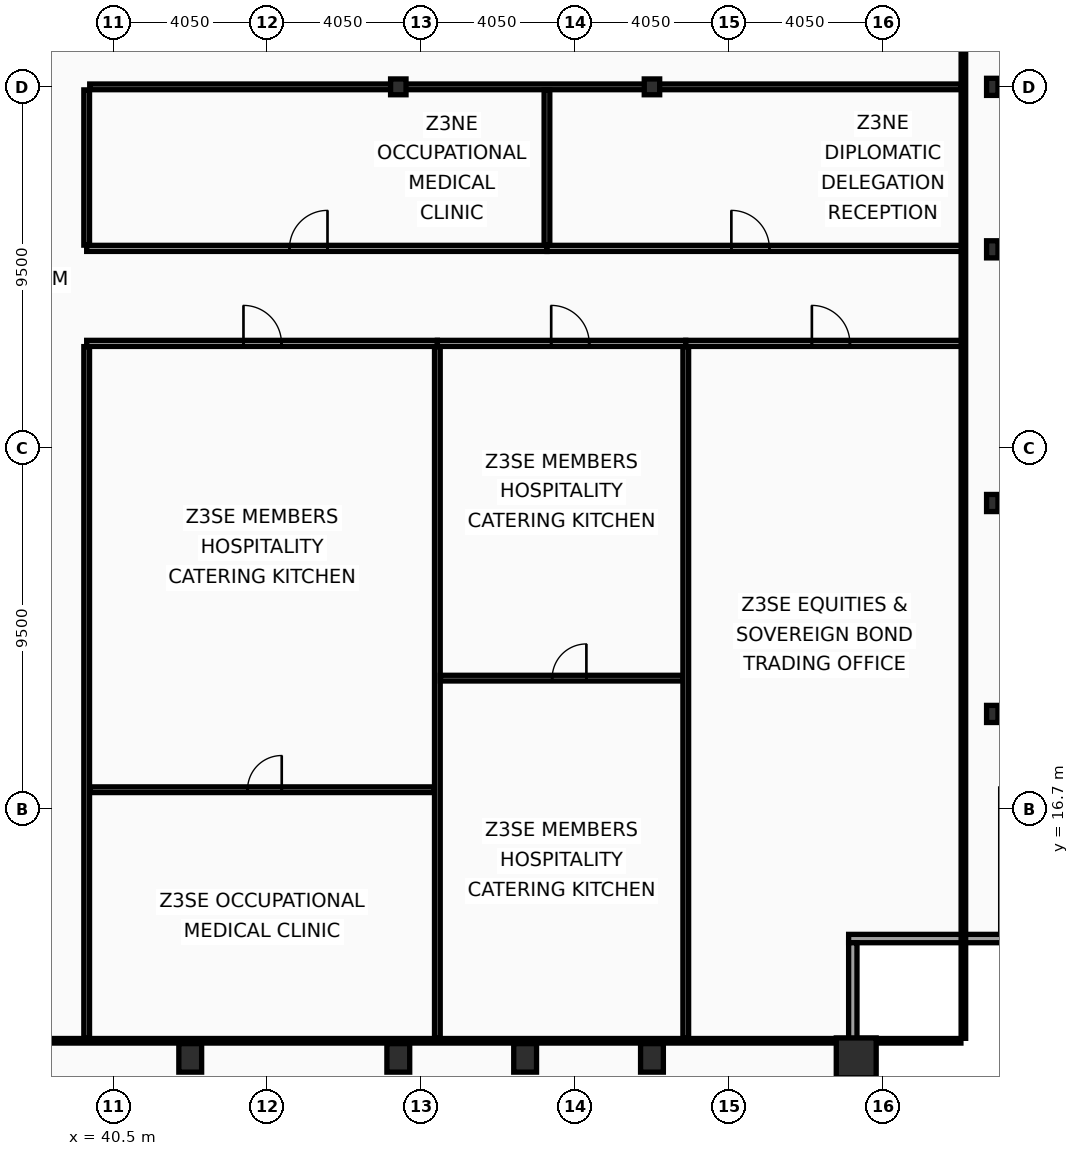
"""IFC4 building model, lengths in metres.
Left out: names, types, materials, properties, quantities, classifications, styles, units other than length and angle.
Written with IfcOpenShell. Run it as: python <this file> out.ifc"""

import sys

from ifc_helpers import new_model, si_unit, direction, frame, frame_2d, origin, origin_2d, place, context, subcontext, project, spatial, rectangle, hollow_rectangle, i_section, extrude, element, fill, save


model = new_model("IFC4")
c1 = context("Model", 3, precision=1e-05, world=origin(), true_north=direction((0.0, 1.0)))
c2 = subcontext(c1, "Body", "Model", "MODEL_VIEW")
j1 = project(units=[si_unit("LENGTHUNIT", "METRE"), si_unit("PLANEANGLEUNIT", "RADIAN")], contexts=[c1])
p1 = place(None, origin())
s1 = spatial("IfcSite", under=j1, at=p1, CompositionType="ELEMENT")
p2 = place(p1, origin())
s2 = spatial("IfcBuilding", under=s1, at=p2, CompositionType="ELEMENT")
p3 = place(p2, frame((0.0, 0.0, 249.8)))
s3 = spatial("IfcBuildingStorey", under=s2, at=p3, CompositionType="ELEMENT", Elevation=249.8)
p4 = place(p3, frame((60.05, 10.15, 0.0), z_axis=(0.0, 0.0, 1.0), x_axis=(1.0, 0.0, 0.0)))
e1 = element("IfcColumn", 1, at=p4, inside=s3, PredefinedType="COLUMN", context=c2, shape_type="SweptSolid", body=[
    extrude(hollow_rectangle(XDim=1.05, YDim=1.05, WallThickness=0.055, at=origin_2d()), origin(), (0.0, 0.0, 1.0), 3.6),
])
for number, where, z_axis, x_axis in (
    (2, (42.525, 10.15, 0.0), (0.0, 0.0, 1.0), (1.0, 0.0, 0.0)),
    (3, (48.0, 10.15, 0.0), (0.0, 0.0, 1.0), (1.0, 0.0, 0.0)),
    (4, (51.337, 10.15, 0.0), (0.0, 0.0, 1.0), (1.0, 0.0, 0.0)),
    (5, (54.675, 10.15, 0.0), (0.0, 0.0, 1.0), (1.0, 0.0, 0.0)),
):
    element("IfcColumn", number, at=place(p3, frame(where, z_axis=z_axis, x_axis=x_axis)), inside=s3, PredefinedType="COLUMN", context=c2, shape_type="SweptSolid", body=[
        extrude(hollow_rectangle(XDim=0.6, YDim=0.75, WallThickness=0.045, at=origin_2d()), origin(), (0.0, 0.0, 1.0), 3.6),
    ])
for number, where, z_axis, x_axis in (
    (6, (63.63, 19.2, 0.0), (0.0, 0.0, 1.0), (1.0, 0.0, 0.0)),
    (7, (63.63, 24.75, 0.0), (0.0, 0.0, 1.0), (1.0, 0.0, 0.0)),
    (8, (63.63, 31.425, 0.0), (0.0, 0.0, 1.0), (1.0, 0.0, 0.0)),
    (9, (63.63, 35.7, 0.0), (0.0, 0.0, 1.0), (1.0, 0.0, 0.0)),
):
    element("IfcColumn", number, at=place(p3, frame(where, z_axis=z_axis, x_axis=x_axis)), inside=s3, PredefinedType="COLUMN", context=c2, shape_type="SweptSolid", body=[
        extrude(i_section(OverallWidth=0.3, OverallDepth=0.45, WebThickness=0.014, FlangeThickness=0.026, at=origin_2d()), origin(), (0.0, 0.0, 1.0), 3.6),
    ])
for number, where, z_axis, x_axis in (
    (10, (48.0, 35.7, 0.0), (0.0, 0.0, 1.0), (1.0, 0.0, 0.0)),
    (11, (54.675, 35.7, 0.0), (0.0, 0.0, 1.0), (1.0, 0.0, 0.0)),
):
    element("IfcColumn", number, at=place(p3, frame(where, z_axis=z_axis, x_axis=x_axis)), inside=s3, PredefinedType="COLUMN", context=c2, shape_type="SweptSolid", body=[
        extrude(i_section(OverallWidth=0.406, OverallDepth=0.416, WebThickness=0.03, FlangeThickness=0.048, at=origin_2d()), origin(), (0.0, 0.0, 1.0), 3.6),
    ])
p5 = place(p3, frame((64.07, 13.29, 0.0), z_axis=(0.0, 0.0, 1.0), x_axis=(-1.0, 0.0, 0.0)))
e12 = element("IfcWall", 12, at=p5, inside=s3, PredefinedType="SOLIDWALL", context=c2, shape_type="SweptSolid", body=[
    extrude(rectangle(XDim=4.22, YDim=0.22, at=frame_2d((2.11, 0.0))), origin(), (0.0, 0.0, 1.0), 2.83),
])
p6 = place(p3, frame((59.96, 13.18, 0.0), z_axis=(0.0, 0.0, 1.0), x_axis=(0.0, -1.0, 0.0)))
e13 = element("IfcWall", 13, at=p6, inside=s3, PredefinedType="SOLIDWALL", context=c2, shape_type="SweptSolid", body=[
    extrude(rectangle(XDim=3.91, YDim=0.22, at=frame_2d((1.955, 0.0))), origin(), (0.0, 0.0, 1.0), 2.83),
])
p7 = place(p3, frame((39.8, 10.665, 0.0), z_axis=(0.0, 0.0, 1.0), x_axis=(0.0, 1.0, 0.0)))
e14 = element("IfcWall", 14, at=p7, inside=s3, PredefinedType="PARTITIONING", context=c2, shape_type="SweptSolid", body=[
    extrude(rectangle(XDim=18.2, YDim=0.15, at=frame_2d((9.1, 0.0))), origin(), (0.0, 0.0, 1.0), 3.03),
])
p8 = place(p3, frame((39.8, 31.535, 0.0), z_axis=(0.0, 0.0, 1.0), x_axis=(0.0, 1.0, 0.0)))
e15 = element("IfcWall", 15, at=p8, inside=s3, PredefinedType="PARTITIONING", context=c2, shape_type="SweptSolid", body=[
    extrude(rectangle(XDim=4.085, YDim=0.15, at=frame_2d((2.042, 0.0))), origin(), (0.0, 0.0, 1.0), 3.03),
])
p9 = place(p3, frame((39.88, 35.7, 0.0), z_axis=(0.0, 0.0, 1.0), x_axis=(1.0, 0.0, 0.0)))
e16 = element("IfcWall", 16, at=p9, inside=s3, PredefinedType="PARTITIONING", context=c2, shape_type="SweptSolid", body=[
    extrude(rectangle(XDim=22.925, YDim=0.15, at=frame_2d((11.462, 0.0))), origin(), (0.0, 0.0, 1.0), 2.78),
])
p10 = place(p3, frame((39.8, 28.95, 0.0), z_axis=(0.0, 0.0, 1.0), x_axis=(1.0, 0.0, 0.0)))
e17 = element("IfcWall", 17, at=p10, inside=s3, PredefinedType="PARTITIONING", context=c2, shape_type="SweptSolid", body=[
    extrude(rectangle(XDim=9.228, YDim=0.16, at=frame_2d((4.614, 0.0))), origin(), (0.0, 0.0, 1.0), 2.78),
])
p11 = place(p10, frame((4.126, 0.0, 0.0)))
e18 = element("IfcOpeningElement", 18, at=p11, cuts=e17, PredefinedType="OPENING", context=c2, shape_type="SweptSolid", body=[
    extrude(rectangle(XDim=1.0, YDim=2.05, at=frame_2d((0.5, 1.025))), frame((0.0, 0.09, 0.0), z_axis=(0.0, -1.0, 0.0), x_axis=(1.0, 0.0, 0.0)), (0.0, 0.0, 1.0), 0.18),
])
p12 = place(p3, frame((39.88, 17.206, 0.0), z_axis=(0.0, 0.0, 1.0), x_axis=(1.0, 0.0, 0.0)))
e19 = element("IfcWall", 19, at=p12, inside=s3, PredefinedType="PARTITIONING", context=c2, shape_type="SweptSolid", body=[
    extrude(rectangle(XDim=9.068, YDim=0.15, at=frame_2d((4.534, 0.0))), origin(), (0.0, 0.0, 1.0), 2.78),
])
p13 = place(p12, frame((4.153, 0.0, 0.0)))
e20 = element("IfcOpeningElement", 20, at=p13, cuts=e19, PredefinedType="OPENING", context=c2, shape_type="SweptSolid", body=[
    extrude(rectangle(XDim=0.9, YDim=2.05, at=frame_2d((0.45, 1.025))), frame((0.0, 0.085, 0.0), z_axis=(0.0, -1.0, 0.0), x_axis=(1.0, 0.0, 0.0)), (0.0, 0.0, 1.0), 0.17),
])
p14 = place(p3, frame((49.028, 28.95, 0.0), z_axis=(0.0, 0.0, 1.0), x_axis=(1.0, 0.0, 0.0)))
e21 = element("IfcWall", 21, at=p14, inside=s3, PredefinedType="PARTITIONING", context=c2, shape_type="SweptSolid", body=[
    extrude(rectangle(XDim=6.536, YDim=0.16, at=frame_2d((3.268, 0.0))), origin(), (0.0, 0.0, 1.0), 2.78),
])
p15 = place(p14, frame((2.995, 0.0, 0.0)))
e22 = element("IfcOpeningElement", 22, at=p15, cuts=e21, PredefinedType="OPENING", context=c2, shape_type="SweptSolid", body=[
    extrude(rectangle(XDim=1.0, YDim=2.05, at=frame_2d((0.5, 1.025))), frame((0.0, 0.09, 0.0), z_axis=(0.0, -1.0, 0.0), x_axis=(1.0, 0.0, 0.0)), (0.0, 0.0, 1.0), 0.18),
])
p16 = place(p3, frame((49.028, 10.665, 0.0), z_axis=(0.0, 0.0, 1.0), x_axis=(0.0, 1.0, 0.0)))
e23 = element("IfcWall", 23, at=p16, inside=s3, PredefinedType="PARTITIONING", context=c2, shape_type="SweptSolid", body=[
    extrude(rectangle(XDim=18.2, YDim=0.15, at=frame_2d((9.1, 0.0))), origin(), (0.0, 0.0, 1.0), 3.03),
])
p17 = place(p3, frame((49.108, 20.142, 0.0), z_axis=(0.0, 0.0, 1.0), x_axis=(1.0, 0.0, 0.0)))
e24 = element("IfcWall", 24, at=p17, inside=s3, PredefinedType="PARTITIONING", context=c2, shape_type="SweptSolid", body=[
    extrude(rectangle(XDim=6.377, YDim=0.15, at=frame_2d((3.188, 0.0))), origin(), (0.0, 0.0, 1.0), 2.78),
])
p18 = place(p17, frame((2.941, 0.0, 0.0)))
e25 = element("IfcOpeningElement", 25, at=p18, cuts=e24, PredefinedType="OPENING", context=c2, shape_type="SweptSolid", body=[
    extrude(rectangle(XDim=0.9, YDim=2.05, at=frame_2d((0.45, 1.025))), frame((0.0, 0.085, 0.0), z_axis=(0.0, -1.0, 0.0), x_axis=(1.0, 0.0, 0.0)), (0.0, 0.0, 1.0), 0.17),
])
p19 = place(p3, frame((55.564, 28.95, 0.0), z_axis=(0.0, 0.0, 1.0), x_axis=(1.0, 0.0, 0.0)))
e26 = element("IfcWall", 26, at=p19, inside=s3, PredefinedType="PARTITIONING", context=c2, shape_type="SweptSolid", body=[
    extrude(rectangle(XDim=7.306, YDim=0.16, at=frame_2d((3.653, 0.0))), origin(), (0.0, 0.0, 1.0), 3.44),
])
p20 = place(p19, frame((3.318, 0.0, 0.0)))
e27 = element("IfcOpeningElement", 27, at=p20, cuts=e26, PredefinedType="OPENING", context=c2, shape_type="SweptSolid", body=[
    extrude(rectangle(XDim=1.0, YDim=2.05, at=frame_2d((0.5, 1.025))), frame((0.0, 0.09, 0.0), z_axis=(0.0, -1.0, 0.0), x_axis=(1.0, 0.0, 0.0)), (0.0, 0.0, 1.0), 0.18),
])
p21 = place(p3, frame((55.564, 10.665, 0.0), z_axis=(0.0, 0.0, 1.0), x_axis=(0.0, 1.0, 0.0)))
e28 = element("IfcWall", 28, at=p21, inside=s3, PredefinedType="PARTITIONING", context=c2, shape_type="SweptSolid", body=[
    extrude(rectangle(XDim=18.2, YDim=0.15, at=frame_2d((9.1, 0.0))), origin(), (0.0, 0.0, 1.0), 2.78),
])
p22 = place(p3, frame((39.8, 31.45, 0.0), z_axis=(0.0, 0.0, 1.0), x_axis=(1.0, 0.0, 0.0)))
e29 = element("IfcWall", 29, at=p22, inside=s3, PredefinedType="PARTITIONING", context=c2, shape_type="SweptSolid", body=[
    extrude(rectangle(XDim=12.112, YDim=0.16, at=frame_2d((6.056, 0.0))), origin(), (0.0, 0.0, 1.0), 2.78),
])
p23 = place(p22, frame((5.337, 0.0, 0.0)))
e30 = element("IfcOpeningElement", 30, at=p23, cuts=e29, PredefinedType="OPENING", context=c2, shape_type="SweptSolid", body=[
    extrude(rectangle(XDim=1.0, YDim=2.05, at=frame_2d((0.5, 1.025))), frame((0.0, 0.09, 0.0), z_axis=(0.0, -1.0, 0.0), x_axis=(1.0, 0.0, 0.0)), (0.0, 0.0, 1.0), 0.18),
])
p24 = place(p3, frame((51.912, 31.45, 0.0), z_axis=(0.0, 0.0, 1.0), x_axis=(1.0, 0.0, 0.0)))
e31 = element("IfcWall", 31, at=p24, inside=s3, PredefinedType="PARTITIONING", context=c2, shape_type="SweptSolid", body=[
    extrude(rectangle(XDim=10.958, YDim=0.16, at=frame_2d((5.479, 0.0))), origin(), (0.0, 0.0, 1.0), 2.78),
])
p25 = place(p24, frame((4.853, 0.0, 0.0)))
e32 = element("IfcOpeningElement", 32, at=p25, cuts=e31, PredefinedType="OPENING", context=c2, shape_type="SweptSolid", body=[
    extrude(rectangle(XDim=1.0, YDim=2.05, at=frame_2d((0.5, 1.025))), frame((0.0, 0.09, 0.0), z_axis=(0.0, -1.0, 0.0), x_axis=(1.0, 0.0, 0.0)), (0.0, 0.0, 1.0), 0.18),
])
p26 = place(p3, frame((51.912, 31.535, 0.0), z_axis=(0.0, 0.0, 1.0), x_axis=(0.0, 1.0, 0.0)))
e33 = element("IfcWall", 33, at=p26, inside=s3, PredefinedType="PARTITIONING", context=c2, shape_type="SweptSolid", body=[
    extrude(rectangle(XDim=4.085, YDim=0.15, at=frame_2d((2.042, 0.0))), origin(), (0.0, 0.0, 1.0), 3.03),
])
p27 = place(p3, frame((62.87, 10.665, 0.0), z_axis=(0.0, 0.0, 1.0), x_axis=(0.0, 1.0, 0.0)))
e34 = element("IfcWall", 34, at=p27, inside=s3, PredefinedType="PARTITIONING", context=c2, shape_type="SweptSolid", body=[
    extrude(rectangle(XDim=42.11, YDim=0.12, at=frame_2d((21.055, 0.0))), origin(), (0.0, 0.0, 1.0), 2.78),
])
p28 = place(p3, frame((10.095, 10.6, 0.0), z_axis=(0.0, 0.0, 1.0), x_axis=(1.0, 0.0, 0.0)))
e35 = element("IfcWall", 35, at=p28, inside=s3, PredefinedType="PARTITIONING", context=c2, shape_type="SweptSolid", body=[
    extrude(rectangle(XDim=52.71, YDim=0.12, at=frame_2d((26.355, 0.0))), origin(), (0.0, 0.0, 1.0), 2.78),
])
p29 = place(p11, origin())
e36 = element("IfcDoor", 36, at=p29, inside=s3, OperationType="SINGLE_SWING_LEFT", PredefinedType="DOOR", context=c2, shape_type="SweptSolid", body=[
    extrude(rectangle(XDim=1.0, YDim=2.05, at=frame_2d((0.5, 1.025))), frame((0.0, 0.025, 0.0), z_axis=(0.0, -1.0, 0.0), x_axis=(1.0, 0.0, 0.0)), (0.0, 0.0, 1.0), 0.05),
])
fill(e18, e36)
p30 = place(p13, origin())
e37 = element("IfcDoor", 37, at=p30, inside=s3, OperationType="SINGLE_SWING_RIGHT", PredefinedType="DOOR", context=c2, shape_type="SweptSolid", body=[
    extrude(rectangle(XDim=0.9, YDim=2.05, at=frame_2d((0.45, 1.025))), frame((0.0, 0.025, 0.0), z_axis=(0.0, -1.0, 0.0), x_axis=(1.0, 0.0, 0.0)), (0.0, 0.0, 1.0), 0.05),
])
fill(e20, e37)
p31 = place(p15, origin())
e38 = element("IfcDoor", 38, at=p31, inside=s3, OperationType="SINGLE_SWING_LEFT", PredefinedType="DOOR", context=c2, shape_type="SweptSolid", body=[
    extrude(rectangle(XDim=1.0, YDim=2.05, at=frame_2d((0.5, 1.025))), frame((0.0, 0.025, 0.0), z_axis=(0.0, -1.0, 0.0), x_axis=(1.0, 0.0, 0.0)), (0.0, 0.0, 1.0), 0.05),
])
fill(e22, e38)
p32 = place(p18, origin())
e39 = element("IfcDoor", 39, at=p32, inside=s3, OperationType="SINGLE_SWING_RIGHT", PredefinedType="DOOR", context=c2, shape_type="SweptSolid", body=[
    extrude(rectangle(XDim=0.9, YDim=2.05, at=frame_2d((0.45, 1.025))), frame((0.0, 0.025, 0.0), z_axis=(0.0, -1.0, 0.0), x_axis=(1.0, 0.0, 0.0)), (0.0, 0.0, 1.0), 0.05),
])
fill(e25, e39)
p33 = place(p20, origin())
e40 = element("IfcDoor", 40, at=p33, inside=s3, OperationType="SINGLE_SWING_LEFT", PredefinedType="DOOR", context=c2, shape_type="SweptSolid", body=[
    extrude(rectangle(XDim=1.0, YDim=2.05, at=frame_2d((0.5, 1.025))), frame((0.0, 0.025, 0.0), z_axis=(0.0, -1.0, 0.0), x_axis=(1.0, 0.0, 0.0)), (0.0, 0.0, 1.0), 0.05),
])
fill(e27, e40)
p34 = place(p23, origin())
e41 = element("IfcDoor", 41, at=p34, inside=s3, OperationType="SINGLE_SWING_RIGHT", PredefinedType="DOOR", context=c2, shape_type="SweptSolid", body=[
    extrude(rectangle(XDim=1.0, YDim=2.05, at=frame_2d((0.5, 1.025))), frame((0.0, 0.025, 0.0), z_axis=(0.0, -1.0, 0.0), x_axis=(1.0, 0.0, 0.0)), (0.0, 0.0, 1.0), 0.05),
])
fill(e30, e41)
p35 = place(p25, origin())
e42 = element("IfcDoor", 42, at=p35, inside=s3, OperationType="SINGLE_SWING_LEFT", PredefinedType="DOOR", context=c2, shape_type="SweptSolid", body=[
    extrude(rectangle(XDim=1.0, YDim=2.05, at=frame_2d((0.5, 1.025))), frame((0.0, 0.025, 0.0), z_axis=(0.0, -1.0, 0.0), x_axis=(1.0, 0.0, 0.0)), (0.0, 0.0, 1.0), 0.05),
])
fill(e32, e42)
save(model, sys.argv[1])
